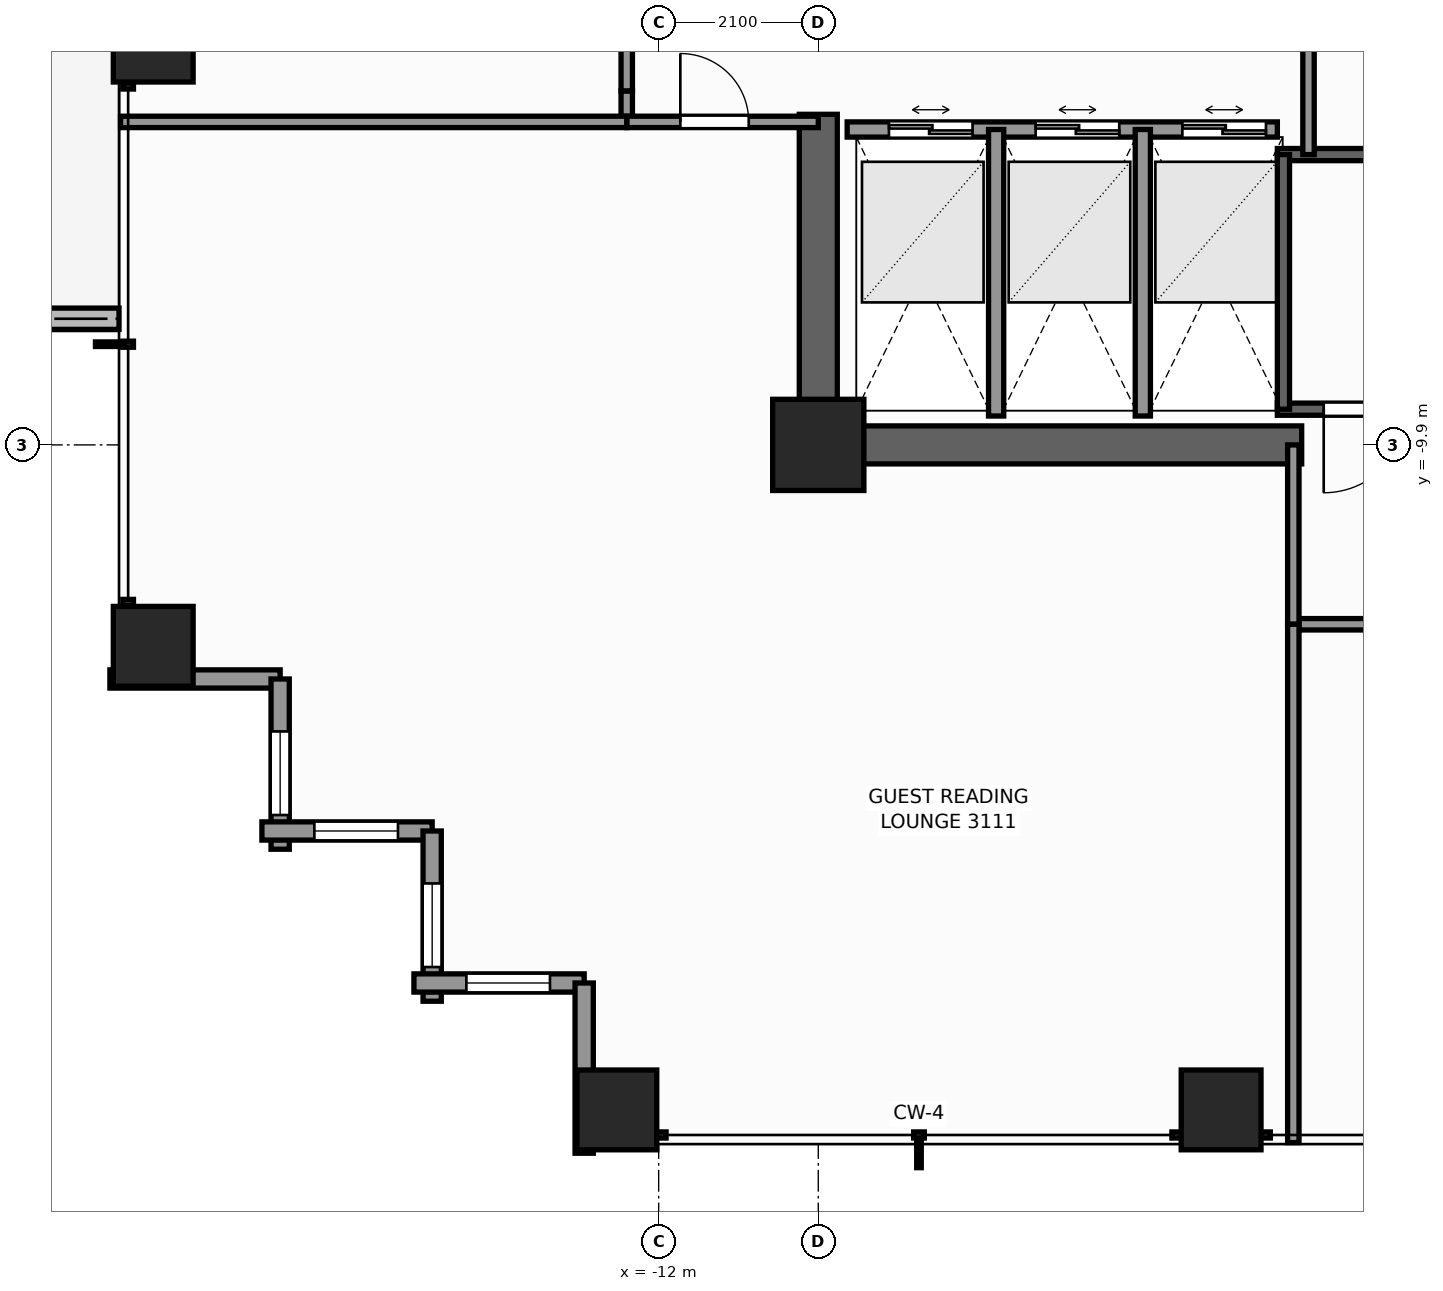
"""IFC4 building model, lengths in metres.
Left out: names, types, materials, properties, quantities, classifications, styles, units other than length and angle.
Written with IfcOpenShell. Run it as: python <this file> out.ifc"""

import sys

from ifc_helpers import new_model, si_unit, direction, frame, frame_2d, origin, origin_2d, place, context, subcontext, project, spatial, rectangle, extrude, element, fill, save


model = new_model("IFC4")
c1 = context("Model", 3, precision=1e-05, world=origin(), true_north=direction((0.0, 1.0)))
c2 = subcontext(c1, "Body", "Model", "MODEL_VIEW")
j1 = project(units=[si_unit("LENGTHUNIT", "METRE"), si_unit("PLANEANGLEUNIT", "RADIAN")], contexts=[c1])
p1 = place(None, origin())
s1 = spatial("IfcSite", under=j1, at=p1, CompositionType="ELEMENT")
p2 = place(p1, origin())
s2 = spatial("IfcBuilding", under=s1, at=p2, CompositionType="ELEMENT")
p3 = place(p2, frame((0.0, 0.0, 108.5)))
s3 = spatial("IfcBuildingStorey", under=s2, at=p3, CompositionType="ELEMENT", Elevation=108.5)
p4 = place(p3, frame((-3.54, -9.9, 0.0), z_axis=(0.0, 0.0, 1.0), x_axis=(-1.0, 0.0, 0.0)))
e1 = element("IfcWall", 1, at=p4, inside=s3, PredefinedType="SHEAR", context=c2, shape_type="SweptSolid", body=[
    extrude(rectangle(XDim=6.61, YDim=0.5, at=frame_2d((3.305, 0.0))), origin(), (0.0, 0.0, 1.0), 3.3),
])
p5 = place(p3, frame((-9.9, -9.65, 0.0), z_axis=(0.0, 0.0, 1.0), x_axis=(0.0, 1.0, 0.0)))
e2 = element("IfcWall", 2, at=p5, inside=s3, PredefinedType="SHEAR", context=c2, shape_type="SweptSolid", body=[
    extrude(rectangle(XDim=4.1, YDim=0.5, at=frame_2d((2.05, 0.0))), origin(), (0.0, 0.0, 1.0), 3.3),
])
p6 = place(p3, frame((-9.9, -9.9, 0.0), z_axis=(0.0, 0.0, 1.0), x_axis=(1.0, 0.0, 0.0)))
e3 = element("IfcColumn", 3, at=p6, inside=s3, PredefinedType="COLUMN", context=c2, shape_type="SweptSolid", body=[
    extrude(rectangle(XDim=1.2, YDim=1.2, at=origin_2d()), origin(), (0.0, 0.0, 1.0), 3.3),
])
for number, where, z_axis, x_axis in (
    (4, (-12.55, -18.65, 0.0), (0.0, 0.0, 1.0), (1.0, 0.0, 0.0)),
    (5, (-4.6, -18.65, 0.0), (0.0, 0.0, 1.0), (1.0, 0.0, 0.0)),
    (6, (-18.65, -12.55, 0.0), (0.0, 0.0, 1.0), (1.0, 0.0, 0.0)),
    (7, (-18.65, -4.6, 0.0), (0.0, 0.0, 1.0), (1.0, 0.0, 0.0)),
):
    element("IfcColumn", number, at=place(p3, frame(where, z_axis=z_axis, x_axis=x_axis)), inside=s3, PredefinedType="COLUMN", context=c2, shape_type="SweptSolid", body=[
        extrude(rectangle(XDim=1.05, YDim=1.05, at=origin_2d()), origin(), (0.0, 0.0, 1.0), 3.3),
    ])
p7 = place(p3, frame((-21.106, -8.24, -0.04), z_axis=(0.0, 0.0, 1.0), x_axis=(1.0, 0.0, 0.0)))
e8 = element("IfcWall", 8, at=p7, inside=s3, PredefinedType="PARAPET", context=c2, shape_type="SweptSolid", body=[
    extrude(rectangle(XDim=2.006, YDim=0.28, at=frame_2d((1.003, 0.0))), origin(), (0.0, 0.0, 1.0), 0.42),
])
p8 = place(p3, frame((-16.98, -12.98, 0.0), z_axis=(0.0, 0.0, 1.0), x_axis=(-1.0, 0.0, 0.0)))
e9 = element("IfcWall", 9, at=p8, inside=s3, PredefinedType="STANDARD", context=c2, shape_type="SweptSolid", body=[
    extrude(rectangle(XDim=2.24, YDim=0.24, at=frame_2d((1.12, 0.0))), origin(), (0.0, 0.0, 1.0), 1.275),
])
p9 = place(p3, frame((-16.98, -15.22, 0.0), z_axis=(0.0, 0.0, 1.0), x_axis=(0.0, 1.0, 0.0)))
e10 = element("IfcWall", 10, at=p9, inside=s3, PredefinedType="STANDARD", context=c2, shape_type="SweptSolid", body=[
    extrude(rectangle(XDim=2.24, YDim=0.24, at=frame_2d((1.12, 0.0))), origin(), (0.0, 0.0, 1.0), 2.459),
])
p10 = place(p9, frame((0.45, 0.0, 0.65)))
e11 = element("IfcOpeningElement", 11, at=p10, cuts=e10, PredefinedType="OPENING", context=c2, shape_type="SweptSolid", body=[
    extrude(rectangle(XDim=1.1, YDim=1.45, at=frame_2d((0.55, 0.725))), frame((0.0, 0.13, 0.0), z_axis=(0.0, -1.0, 0.0), x_axis=(1.0, 0.0, 0.0)), (0.0, 0.0, 1.0), 0.26),
])
p11 = place(p3, frame((-14.98, -14.98, 0.0), z_axis=(0.0, 0.0, 1.0), x_axis=(-1.0, 0.0, 0.0)))
e12 = element("IfcWall", 12, at=p11, inside=s3, PredefinedType="STANDARD", context=c2, shape_type="SweptSolid", body=[
    extrude(rectangle(XDim=2.24, YDim=0.24, at=frame_2d((1.12, 0.0))), origin(), (0.0, 0.0, 1.0), 2.459),
])
p12 = place(p11, frame((0.45, 0.0, 0.65)))
e13 = element("IfcOpeningElement", 13, at=p12, cuts=e12, PredefinedType="OPENING", context=c2, shape_type="SweptSolid", body=[
    extrude(rectangle(XDim=1.1, YDim=1.45, at=frame_2d((0.55, 0.725))), frame((0.0, 0.13, 0.0), z_axis=(0.0, -1.0, 0.0), x_axis=(1.0, 0.0, 0.0)), (0.0, 0.0, 1.0), 0.26),
])
p13 = place(p3, frame((-14.98, -17.22, 0.0), z_axis=(0.0, 0.0, 1.0), x_axis=(0.0, 1.0, 0.0)))
e14 = element("IfcWall", 14, at=p13, inside=s3, PredefinedType="STANDARD", context=c2, shape_type="SweptSolid", body=[
    extrude(rectangle(XDim=2.24, YDim=0.24, at=frame_2d((1.12, 0.0))), origin(), (0.0, 0.0, 1.0), 2.459),
])
p14 = place(p13, frame((0.45, 0.0, 0.65)))
e15 = element("IfcOpeningElement", 15, at=p14, cuts=e14, PredefinedType="OPENING", context=c2, shape_type="SweptSolid", body=[
    extrude(rectangle(XDim=1.1, YDim=1.45, at=frame_2d((0.55, 0.725))), frame((0.0, 0.13, 0.0), z_axis=(0.0, -1.0, 0.0), x_axis=(1.0, 0.0, 0.0)), (0.0, 0.0, 1.0), 0.26),
])
p15 = place(p3, frame((-12.98, -16.98, 0.0), z_axis=(0.0, 0.0, 1.0), x_axis=(-1.0, 0.0, 0.0)))
e16 = element("IfcWall", 16, at=p15, inside=s3, PredefinedType="STANDARD", context=c2, shape_type="SweptSolid", body=[
    extrude(rectangle(XDim=2.24, YDim=0.24, at=frame_2d((1.12, 0.0))), origin(), (0.0, 0.0, 1.0), 2.459),
])
p16 = place(p15, frame((0.45, 0.0, 0.65)))
e17 = element("IfcOpeningElement", 17, at=p16, cuts=e16, PredefinedType="OPENING", context=c2, shape_type="SweptSolid", body=[
    extrude(rectangle(XDim=1.1, YDim=1.45, at=frame_2d((0.55, 0.725))), frame((0.0, 0.13, 0.0), z_axis=(0.0, -1.0, 0.0), x_axis=(1.0, 0.0, 0.0)), (0.0, 0.0, 1.0), 0.26),
])
p17 = place(p3, frame((-12.98, -19.22, 0.0), z_axis=(0.0, 0.0, 1.0), x_axis=(0.0, 1.0, 0.0)))
e18 = element("IfcWall", 18, at=p17, inside=s3, PredefinedType="STANDARD", context=c2, shape_type="SweptSolid", body=[
    extrude(rectangle(XDim=2.24, YDim=0.24, at=frame_2d((1.12, 0.0))), origin(), (0.0, 0.0, 1.0), 1.275),
])
p18 = place(p3, frame((3.86, -9.43, 0.0), z_axis=(0.0, 0.0, 1.0), x_axis=(-1.0, 0.0, 0.0)))
e19 = element("IfcWall", 19, at=p18, inside=s3, PredefinedType="SHEAR", context=c2, shape_type="SweptSolid", body=[
    extrude(rectangle(XDim=7.72, YDim=0.16, at=frame_2d((3.86, 0.0))), origin(), (0.0, 0.0, 1.0), 3.3),
])
p19 = place(p18, frame((6.01, 0.0, 0.0)))
e20 = element("IfcOpeningElement", 20, at=p19, cuts=e19, PredefinedType="OPENING", context=c2, shape_type="SweptSolid", body=[
    extrude(rectangle(XDim=1.1, YDim=2.2, at=frame_2d((0.55, 1.1))), frame((0.0, 0.09, 0.0), z_axis=(0.0, -1.0, 0.0), x_axis=(1.0, 0.0, 0.0)), (0.0, 0.0, 1.0), 0.18),
])
p20 = place(p3, frame((-3.86, -6.08, 0.0), z_axis=(0.0, 0.0, 1.0), x_axis=(1.0, 0.0, 0.0)))
e21 = element("IfcWall", 21, at=p20, inside=s3, PredefinedType="SHEAR", context=c2, shape_type="SweptSolid", body=[
    extrude(rectangle(XDim=7.72, YDim=0.16, at=frame_2d((3.86, 0.0))), origin(), (0.0, 0.0, 1.0), 3.3),
])
p21 = place(p3, frame((-3.78, -9.43, 0.0), z_axis=(0.0, 0.0, 1.0), x_axis=(0.0, 1.0, 0.0)))
e22 = element("IfcWall", 22, at=p21, inside=s3, PredefinedType="SHEAR", context=c2, shape_type="SweptSolid", body=[
    extrude(rectangle(XDim=3.35, YDim=0.16, at=frame_2d((1.675, 0.0))), origin(), (0.0, 0.0, 1.0), 3.3),
])
p22 = place(p3, frame((-9.52, -5.75, 0.0), z_axis=(0.0, 0.0, 1.0), x_axis=(1.0, 0.0, 0.0)))
e23 = element("IfcWall", 23, at=p22, inside=s3, PredefinedType="SOLIDWALL", context=c2, shape_type="SweptSolid", body=[
    extrude(rectangle(XDim=5.66, YDim=0.2, at=frame_2d((2.83, 0.0))), origin(), (0.0, 0.0, 1.0), 3.08),
])
p23 = place(p22, frame((0.55, 0.0, 0.0)))
e24 = element("IfcOpeningElement", 24, at=p23, cuts=e23, PredefinedType="OPENING", context=c2, shape_type="SweptSolid", body=[
    extrude(rectangle(XDim=1.1, YDim=2.2, at=frame_2d((0.55, 1.1))), frame((0.0, 0.11, 0.0), z_axis=(0.0, -1.0, 0.0), x_axis=(1.0, 0.0, 0.0)), (0.0, 0.0, 1.0), 0.22),
])
p24 = place(p22, frame((2.48, 0.0, 0.0)))
e25 = element("IfcOpeningElement", 25, at=p24, cuts=e23, PredefinedType="OPENING", context=c2, shape_type="SweptSolid", body=[
    extrude(rectangle(XDim=1.1, YDim=2.2, at=frame_2d((0.55, 1.1))), frame((0.0, 0.11, 0.0), z_axis=(0.0, -1.0, 0.0), x_axis=(1.0, 0.0, 0.0)), (0.0, 0.0, 1.0), 0.22),
])
p25 = place(p22, frame((4.41, 0.0, 0.0)))
e26 = element("IfcOpeningElement", 26, at=p25, cuts=e23, PredefinedType="OPENING", context=c2, shape_type="SweptSolid", body=[
    extrude(rectangle(XDim=1.1, YDim=2.2, at=frame_2d((0.55, 1.1))), frame((0.0, 0.11, 0.0), z_axis=(0.0, -1.0, 0.0), x_axis=(1.0, 0.0, 0.0)), (0.0, 0.0, 1.0), 0.22),
])
for number, where, z_axis, x_axis in (
    (27, (-7.56, -9.52, 0.0), (0.0, 0.0, 1.0), (0.0, 1.0, 0.0)),
    (28, (-5.63, -9.52, 0.0), (0.0, 0.0, 1.0), (0.0, 1.0, 0.0)),
):
    element("IfcWall", number, at=place(p3, frame(where, z_axis=z_axis, x_axis=x_axis)), inside=s3, PredefinedType="SOLIDWALL", context=c2, shape_type="SweptSolid", body=[
        extrude(rectangle(XDim=3.77, YDim=0.2, at=frame_2d((1.885, 0.0))), origin(), (0.0, 0.0, 1.0), 3.08),
    ])
p26 = place(p3, frame((-3.45, -6.08, 0.0), z_axis=(0.0, 0.0, 1.0), x_axis=(0.0, 1.0, 0.0)))
e29 = element("IfcWall", 29, at=p26, inside=s3, PredefinedType="PARTITIONING", context=c2, shape_type="SweptSolid", body=[
    extrude(rectangle(XDim=2.36, YDim=0.15, at=frame_2d((1.18, 0.0))), origin(), (0.0, 0.0, 1.0), 3.08),
])
p27 = place(p3, frame((-3.65, -12.26, 0.0), z_axis=(0.0, 0.0, 1.0), x_axis=(1.0, 0.0, 0.0)))
e30 = element("IfcWall", 30, at=p27, inside=s3, PredefinedType="PARTITIONING", context=c2, shape_type="SweptSolid", body=[
    extrude(rectangle(XDim=7.608, YDim=0.15, at=frame_2d((3.804, 0.0))), origin(), (0.0, 0.0, 1.0), 2.369),
])
p28 = place(p3, frame((-3.65, -12.26, 0.0), z_axis=(0.0, 0.0, 1.0), x_axis=(0.0, 1.0, 0.0)))
e31 = element("IfcWall", 31, at=p28, inside=s3, PredefinedType="PARTITIONING", context=c2, shape_type="SweptSolid", body=[
    extrude(rectangle(XDim=2.36, YDim=0.15, at=frame_2d((1.18, 0.0))), origin(), (0.0, 0.0, 1.0), 3.08),
])
p29 = place(p3, frame((-12.42, -5.65, 0.0), z_axis=(0.0, 0.0, 1.0), x_axis=(0.0, 1.0, 0.0)))
e32 = element("IfcWall", 32, at=p29, inside=s3, PredefinedType="PARTITIONING", context=c2, shape_type="SweptSolid", body=[
    extrude(rectangle(XDim=0.408, YDim=0.15, at=frame_2d((0.204, 0.0))), origin(), (0.0, 0.0, 1.0), 3.08),
])
p30 = place(p3, frame((-12.42, -5.242, 0.0), z_axis=(0.0, 0.0, 1.0), x_axis=(0.0, 1.0, 0.0)))
e33 = element("IfcWall", 33, at=p30, inside=s3, PredefinedType="PARTITIONING", context=c2, shape_type="SweptSolid", body=[
    extrude(rectangle(XDim=1.284, YDim=0.15, at=frame_2d((0.642, 0.0))), origin(), (0.0, 0.0, 1.0), 1.265),
])
p31 = place(p3, frame((-12.42, -5.65, 0.0), z_axis=(0.0, 0.0, 1.0), x_axis=(1.0, 0.0, 0.0)))
e34 = element("IfcWall", 34, at=p31, inside=s3, PredefinedType="PARTITIONING", context=c2, shape_type="SweptSolid", body=[
    extrude(rectangle(XDim=2.52, YDim=0.15, at=frame_2d((1.26, 0.0))), origin(), (0.0, 0.0, 1.0), 3.08),
])
p32 = place(p31, frame((0.705, 0.0, 0.0)))
e35 = element("IfcOpeningElement", 35, at=p32, cuts=e34, PredefinedType="OPENING", context=c2, shape_type="SweptSolid", body=[
    extrude(rectangle(XDim=0.9, YDim=2.06, at=frame_2d((0.45, 1.03))), frame((0.0, 0.085, 0.0), z_axis=(0.0, -1.0, 0.0), x_axis=(1.0, 0.0, 0.0)), (0.0, 0.0, 1.0), 0.17),
])
p33 = place(p3, frame((-19.08, -5.65, 0.0), z_axis=(0.0, 0.0, 1.0), x_axis=(1.0, 0.0, 0.0)))
e36 = element("IfcWall", 36, at=p33, inside=s3, PredefinedType="PARTITIONING", context=c2, shape_type="SweptSolid", body=[
    extrude(rectangle(XDim=6.66, YDim=0.15, at=frame_2d((3.33, 0.0))), origin(), (0.0, 0.0, 1.0), 2.449),
])
p34 = place(p3, frame((-3.65, -19.08, 0.0), z_axis=(0.0, 0.0, 1.0), x_axis=(0.0, 1.0, 0.0)))
e37 = element("IfcWall", 37, at=p34, inside=s3, PredefinedType="PARTITIONING", context=c2, shape_type="SweptSolid", body=[
    extrude(rectangle(XDim=6.82, YDim=0.15, at=frame_2d((3.41, 0.0))), origin(), (0.0, 0.0, 1.0), 2.449),
])
p35 = place(p10, origin())
e38 = element("IfcWindow", 38, at=p35, inside=s3, PartitioningType="SINGLE_PANEL", PredefinedType="WINDOW", context=c2, shape_type="SweptSolid", body=[
    extrude(rectangle(XDim=1.1, YDim=1.45, at=frame_2d((0.55, 0.725))), frame((0.0, 0.03, 0.0), z_axis=(0.0, -1.0, 0.0), x_axis=(1.0, 0.0, 0.0)), (0.0, 0.0, 1.0), 0.06),
])
fill(e11, e38)
p36 = place(p12, origin())
e39 = element("IfcWindow", 39, at=p36, inside=s3, PartitioningType="SINGLE_PANEL", PredefinedType="WINDOW", context=c2, shape_type="SweptSolid", body=[
    extrude(rectangle(XDim=1.1, YDim=1.45, at=frame_2d((0.55, 0.725))), frame((0.0, 0.03, 0.0), z_axis=(0.0, -1.0, 0.0), x_axis=(1.0, 0.0, 0.0)), (0.0, 0.0, 1.0), 0.06),
])
fill(e13, e39)
p37 = place(p14, origin())
e40 = element("IfcWindow", 40, at=p37, inside=s3, PartitioningType="SINGLE_PANEL", PredefinedType="WINDOW", context=c2, shape_type="SweptSolid", body=[
    extrude(rectangle(XDim=1.1, YDim=1.45, at=frame_2d((0.55, 0.725))), frame((0.0, 0.03, 0.0), z_axis=(0.0, -1.0, 0.0), x_axis=(1.0, 0.0, 0.0)), (0.0, 0.0, 1.0), 0.06),
])
fill(e15, e40)
p38 = place(p16, origin())
e41 = element("IfcWindow", 41, at=p38, inside=s3, PartitioningType="SINGLE_PANEL", PredefinedType="WINDOW", context=c2, shape_type="SweptSolid", body=[
    extrude(rectangle(XDim=1.1, YDim=1.45, at=frame_2d((0.55, 0.725))), frame((0.0, 0.03, 0.0), z_axis=(0.0, -1.0, 0.0), x_axis=(1.0, 0.0, 0.0)), (0.0, 0.0, 1.0), 0.06),
])
fill(e17, e41)
p39 = place(p19, origin())
e42 = element("IfcDoor", 42, at=p39, inside=s3, OperationType="SINGLE_SWING_RIGHT", PredefinedType="DOOR", context=c2, shape_type="SweptSolid", body=[
    extrude(rectangle(XDim=1.1, YDim=2.2, at=frame_2d((0.55, 1.1))), frame((0.0, 0.025, 0.0), z_axis=(0.0, -1.0, 0.0), x_axis=(1.0, 0.0, 0.0)), (0.0, 0.0, 1.0), 0.05),
])
fill(e20, e42)
p40 = place(p23, origin())
e43 = element("IfcDoor", 43, at=p40, inside=s3, OperationType="DOUBLE_DOOR_SLIDING", PredefinedType="DOOR", context=c2, shape_type="SweptSolid", body=[
    extrude(rectangle(XDim=1.1, YDim=2.2, at=frame_2d((0.55, 1.1))), frame((0.0, 0.025, 0.0), z_axis=(0.0, -1.0, 0.0), x_axis=(1.0, 0.0, 0.0)), (0.0, 0.0, 1.0), 0.05),
])
fill(e24, e43)
p41 = place(p24, origin())
e44 = element("IfcDoor", 44, at=p41, inside=s3, OperationType="DOUBLE_DOOR_SLIDING", PredefinedType="DOOR", context=c2, shape_type="SweptSolid", body=[
    extrude(rectangle(XDim=1.1, YDim=2.2, at=frame_2d((0.55, 1.1))), frame((0.0, 0.025, 0.0), z_axis=(0.0, -1.0, 0.0), x_axis=(1.0, 0.0, 0.0)), (0.0, 0.0, 1.0), 0.05),
])
fill(e25, e44)
p42 = place(p25, origin())
e45 = element("IfcDoor", 45, at=p42, inside=s3, OperationType="DOUBLE_DOOR_SLIDING", PredefinedType="DOOR", context=c2, shape_type="SweptSolid", body=[
    extrude(rectangle(XDim=1.1, YDim=2.2, at=frame_2d((0.55, 1.1))), frame((0.0, 0.025, 0.0), z_axis=(0.0, -1.0, 0.0), x_axis=(1.0, 0.0, 0.0)), (0.0, 0.0, 1.0), 0.05),
])
fill(e26, e45)
p43 = place(p32, origin())
e46 = element("IfcDoor", 46, at=p43, inside=s3, OperationType="SINGLE_SWING_LEFT", PredefinedType="DOOR", context=c2, shape_type="SweptSolid", body=[
    extrude(rectangle(XDim=0.9, YDim=2.06, at=frame_2d((0.45, 1.03))), frame((0.0, 0.025, 0.0), z_axis=(0.0, -1.0, 0.0), x_axis=(1.0, 0.0, 0.0)), (0.0, 0.0, 1.0), 0.05),
])
fill(e35, e46)
save(model, sys.argv[1])
